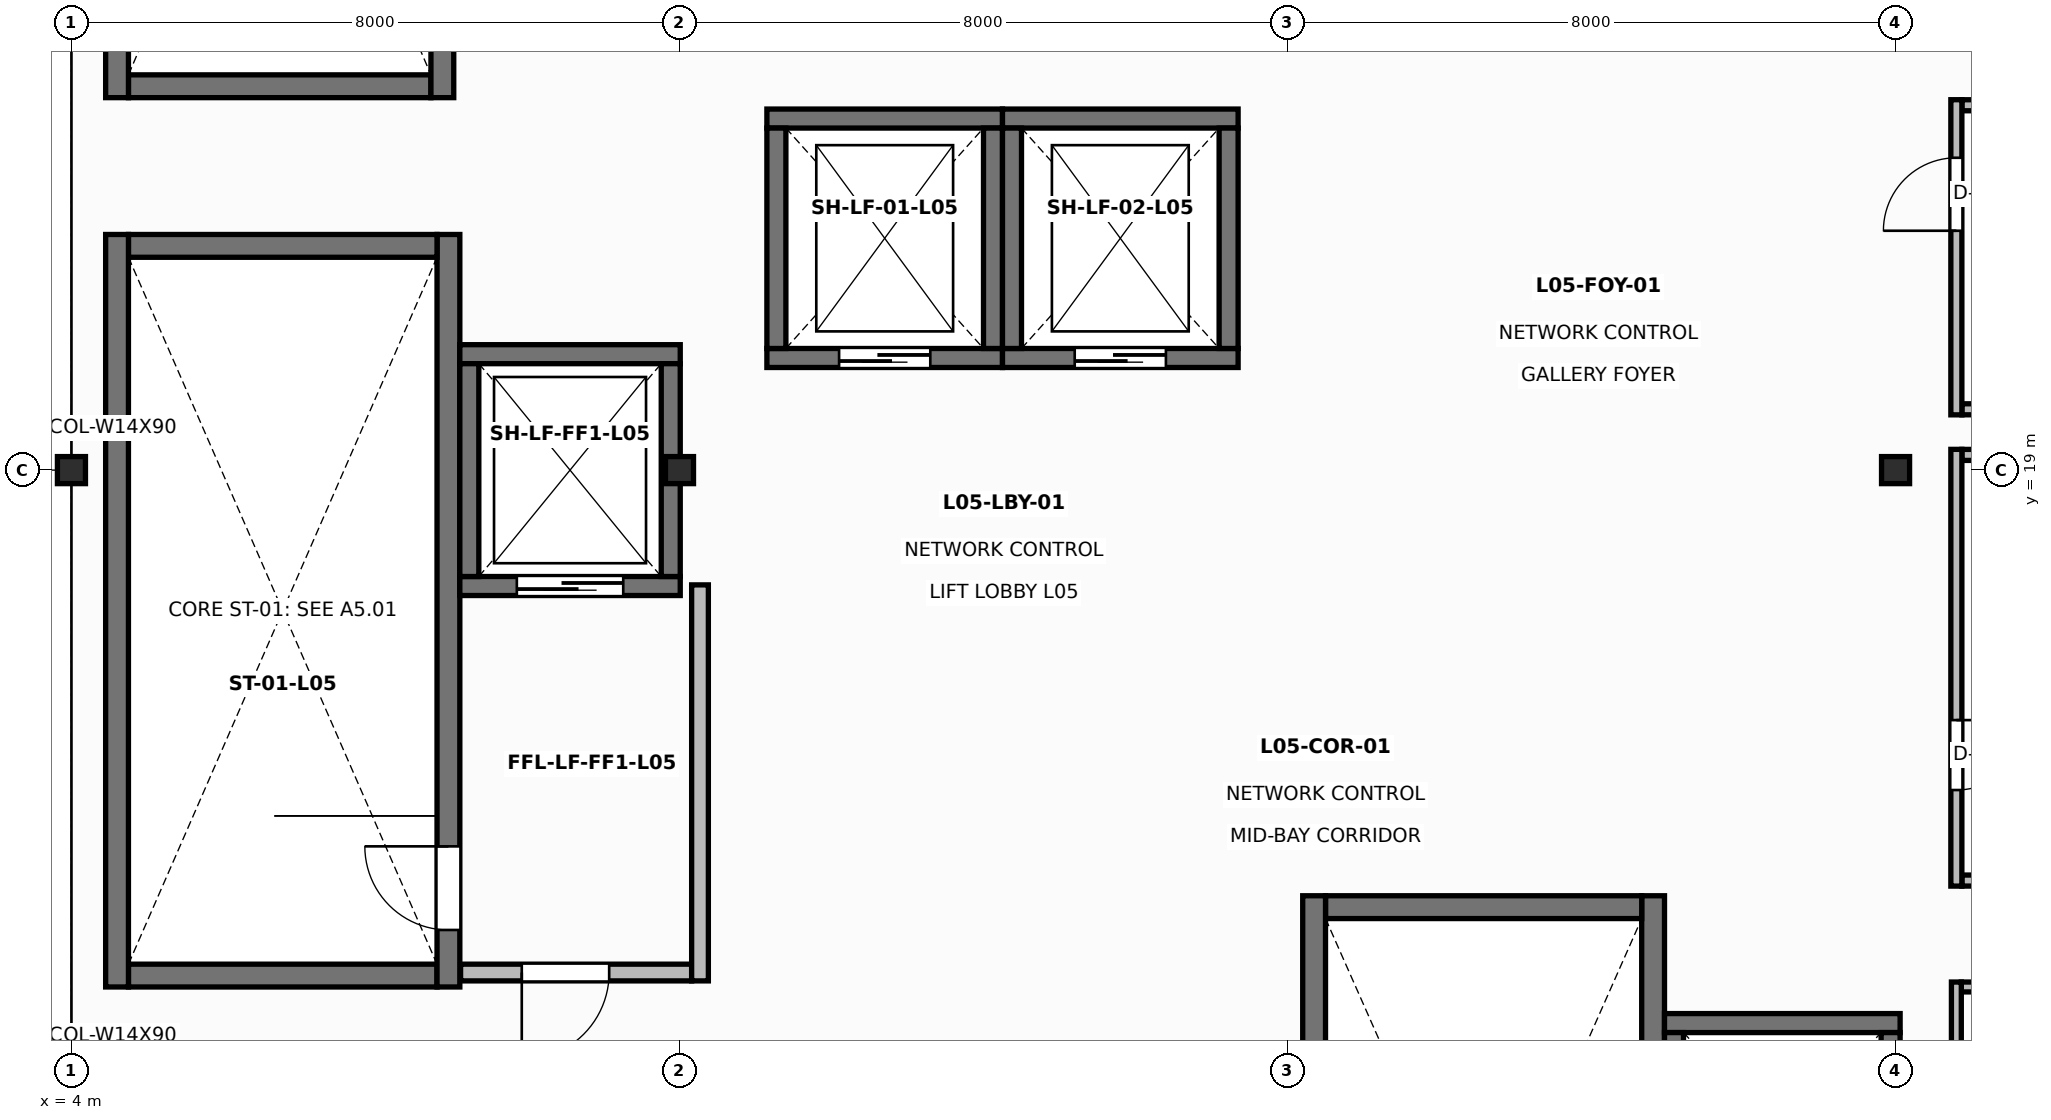
"""IFC4 building model, lengths in metres.
Left out: names, types, materials, properties, quantities, classifications, styles, units other than length and angle.
Written with IfcOpenShell. Run it as: python <this file> out.ifc"""

import sys

from ifc_helpers import new_model, si_unit, direction, frame, frame_2d, origin, origin_2d, place, context, subcontext, project, spatial, rectangle, i_section, extrude, element, fill, save


model = new_model("IFC4")
c1 = context("Model", 3, precision=1e-05, world=origin(), true_north=direction((0.0, 1.0)))
c2 = subcontext(c1, "Body", "Model", "MODEL_VIEW")
j1 = project(units=[si_unit("LENGTHUNIT", "METRE"), si_unit("PLANEANGLEUNIT", "RADIAN")], contexts=[c1])
p1 = place(None, origin())
s1 = spatial("IfcSite", under=j1, at=p1, CompositionType="ELEMENT")
p2 = place(p1, origin())
s2 = spatial("IfcBuilding", under=s1, at=p2, CompositionType="ELEMENT")
p3 = place(p2, frame((0.0, 0.0, 24.0)))
s3 = spatial("IfcBuildingStorey", under=s2, at=p3, CompositionType="ELEMENT", Elevation=24.0)
for number, where, z_axis, x_axis in (
    (1, (4.0, 19.0, 0.0), (0.0, 0.0, 1.0), (1.0, 0.0, 0.0)),
    (2, (12.0, 19.0, 0.0), (0.0, 0.0, 1.0), (1.0, 0.0, 0.0)),
    (3, (28.0, 19.0, 0.0), (0.0, 0.0, 1.0), (1.0, 0.0, 0.0)),
):
    element("IfcColumn", number, at=place(p3, frame(where, z_axis=z_axis, x_axis=x_axis)), inside=s3, PredefinedType="COLUMN", context=c2, shape_type="SweptSolid", body=[
        extrude(i_section(OverallWidth=0.369, OverallDepth=0.356, WebThickness=0.011, FlangeThickness=0.018, at=origin_2d()), origin(), (0.0, 0.0, 1.0), 4.0),
    ])
p4 = place(p3, frame((4.75, 12.35, 0.0), z_axis=(0.0, 0.0, 1.0), x_axis=(1.0, 0.0, 0.0)))
e4 = element("IfcWall", 4, at=p4, inside=s3, PredefinedType="SHEAR", context=c2, shape_type="SweptSolid", body=[
    extrude(rectangle(XDim=4.06, YDim=0.3, at=frame_2d((2.03, 0.0))), origin(), (0.0, 0.0, 1.0), 3.6),
])
p5 = place(p3, frame((8.96, 12.2, 0.0), z_axis=(0.0, 0.0, 1.0), x_axis=(0.0, 1.0, 0.0)))
e5 = element("IfcWall", 5, at=p5, inside=s3, PredefinedType="SHEAR", context=c2, shape_type="SweptSolid", body=[
    extrude(rectangle(XDim=9.9, YDim=0.3, at=frame_2d((4.95, 0.0))), origin(), (0.0, 0.0, 1.0), 3.6),
])
p6 = place(p5, frame((0.75, 0.0, 0.0)))
e6 = element("IfcOpeningElement", 6, at=p6, cuts=e5, PredefinedType="OPENING", context=c2, shape_type="SweptSolid", body=[
    extrude(rectangle(XDim=1.1, YDim=2.15, at=frame_2d((0.55, 1.075))), frame((0.0, 0.16, 0.0), z_axis=(0.0, -1.0, 0.0), x_axis=(1.0, 0.0, 0.0)), (0.0, 0.0, 1.0), 0.32),
])
p7 = place(p3, frame((8.81, 21.95, 0.0), z_axis=(0.0, 0.0, 1.0), x_axis=(-1.0, 0.0, 0.0)))
e7 = element("IfcWall", 7, at=p7, inside=s3, PredefinedType="SHEAR", context=c2, shape_type="SweptSolid", body=[
    extrude(rectangle(XDim=4.06, YDim=0.3, at=frame_2d((2.03, 0.0))), origin(), (0.0, 0.0, 1.0), 3.6),
])
p8 = place(p3, frame((4.6, 22.1, 0.0), z_axis=(0.0, 0.0, 1.0), x_axis=(0.0, -1.0, 0.0)))
e8 = element("IfcWall", 8, at=p8, inside=s3, PredefinedType="SHEAR", context=c2, shape_type="SweptSolid", body=[
    extrude(rectangle(XDim=9.9, YDim=0.3, at=frame_2d((4.95, 0.0))), origin(), (0.0, 0.0, 1.0), 3.6),
])
p9 = place(p3, frame((4.75, 24.05, 0.0), z_axis=(0.0, 0.0, 1.0), x_axis=(1.0, 0.0, 0.0)))
e9 = element("IfcWall", 9, at=p9, inside=s3, PredefinedType="SHEAR", context=c2, shape_type="SweptSolid", body=[
    extrude(rectangle(XDim=3.98, YDim=0.3, at=frame_2d((1.99, 0.0))), origin(), (0.0, 0.0, 1.0), 3.6),
])
p10 = place(p3, frame((8.88, 23.9, 0.0), z_axis=(0.0, 0.0, 1.0), x_axis=(0.0, 1.0, 0.0)))
e10 = element("IfcWall", 10, at=p10, inside=s3, PredefinedType="SHEAR", context=c2, shape_type="SweptSolid", body=[
    extrude(rectangle(XDim=9.9, YDim=0.3, at=frame_2d((4.95, 0.0))), origin(), (0.0, 0.0, 1.0), 3.6),
])
p11 = place(p10, frame((0.75, 0.0, 0.0)))
e11 = element("IfcOpeningElement", 11, at=p11, cuts=e10, PredefinedType="OPENING", context=c2, shape_type="SweptSolid", body=[
    extrude(rectangle(XDim=1.1, YDim=2.15, at=frame_2d((0.55, 1.075))), frame((0.0, 0.16, 0.0), z_axis=(0.0, -1.0, 0.0), x_axis=(1.0, 0.0, 0.0)), (0.0, 0.0, 1.0), 0.32),
])
p12 = place(p3, frame((4.6, 33.8, 0.0), z_axis=(0.0, 0.0, 1.0), x_axis=(0.0, -1.0, 0.0)))
e12 = element("IfcWall", 12, at=p12, inside=s3, PredefinedType="SHEAR", context=c2, shape_type="SweptSolid", body=[
    extrude(rectangle(XDim=9.9, YDim=0.3, at=frame_2d((4.95, 0.0))), origin(), (0.0, 0.0, 1.0), 3.6),
])
p13 = place(p3, frame((24.81, 3.4, 0.0), z_axis=(0.0, 0.0, 1.0), x_axis=(0.0, 1.0, 0.0)))
e13 = element("IfcWall", 13, at=p13, inside=s3, PredefinedType="SHEAR", context=c2, shape_type="SweptSolid", body=[
    extrude(rectangle(XDim=10.0, YDim=0.3, at=frame_2d((5.0, 0.0))), origin(), (0.0, 0.0, 1.0), 3.6),
])
p14 = place(p13, frame((0.75, 0.0, 0.0)))
e14 = element("IfcOpeningElement", 14, at=p14, cuts=e13, PredefinedType="OPENING", context=c2, shape_type="SweptSolid", body=[
    extrude(rectangle(XDim=1.1, YDim=2.15, at=frame_2d((0.55, 1.075))), frame((0.0, 0.16, 0.0), z_axis=(0.0, -1.0, 0.0), x_axis=(1.0, 0.0, 0.0)), (0.0, 0.0, 1.0), 0.32),
])
p15 = place(p3, frame((24.66, 13.25, 0.0), z_axis=(0.0, 0.0, 1.0), x_axis=(-1.0, 0.0, 0.0)))
e15 = element("IfcWall", 15, at=p15, inside=s3, PredefinedType="SHEAR", context=c2, shape_type="SweptSolid", body=[
    extrude(rectangle(XDim=4.16, YDim=0.3, at=frame_2d((2.08, 0.0))), origin(), (0.0, 0.0, 1.0), 3.6),
])
p16 = place(p3, frame((20.35, 13.4, 0.0), z_axis=(0.0, 0.0, 1.0), x_axis=(0.0, -1.0, 0.0)))
e16 = element("IfcWall", 16, at=p16, inside=s3, PredefinedType="SHEAR", context=c2, shape_type="SweptSolid", body=[
    extrude(rectangle(XDim=10.0, YDim=0.3, at=frame_2d((5.0, 0.0))), origin(), (0.0, 0.0, 1.0), 3.6),
])
p17 = place(p3, frame((9.11, 17.475, 0.0), z_axis=(0.0, 0.0, 1.0), x_axis=(1.0, 0.0, 0.0)))
e17 = element("IfcWall", 17, at=p17, inside=s3, PredefinedType="SOLIDWALL", context=c2, shape_type="SweptSolid", body=[
    extrude(rectangle(XDim=2.9, YDim=0.25, at=frame_2d((1.45, 0.0))), origin(), (0.0, 0.0, 1.0), 3.35),
])
p18 = place(p17, frame((0.75, 0.0, 0.0)))
e18 = element("IfcOpeningElement", 18, at=p18, cuts=e17, PredefinedType="OPENING", context=c2, shape_type="SweptSolid", body=[
    extrude(rectangle(XDim=1.4, YDim=2.25, at=frame_2d((0.7, 1.125))), frame((0.0, 0.135, 0.0), z_axis=(0.0, -1.0, 0.0), x_axis=(1.0, 0.0, 0.0)), (0.0, 0.0, 1.0), 0.27),
])
p19 = place(p3, frame((12.01, 20.525, 0.0), z_axis=(0.0, 0.0, 1.0), x_axis=(-1.0, 0.0, 0.0)))
e19 = element("IfcWall", 19, at=p19, inside=s3, PredefinedType="SOLIDWALL", context=c2, shape_type="SweptSolid", body=[
    extrude(rectangle(XDim=2.9, YDim=0.25, at=frame_2d((1.45, 0.0))), origin(), (0.0, 0.0, 1.0), 3.35),
])
for number, where, z_axis, x_axis in (
    (20, (11.885, 17.6, 0.0), (0.0, 0.0, 1.0), (0.0, 1.0, 0.0)),
    (21, (9.235, 20.4, 0.0), (0.0, 0.0, 1.0), (0.0, -1.0, 0.0)),
):
    element("IfcWall", number, at=place(p3, frame(where, z_axis=z_axis, x_axis=x_axis)), inside=s3, PredefinedType="SOLIDWALL", context=c2, shape_type="SweptSolid", body=[
        extrude(rectangle(XDim=2.8, YDim=0.25, at=frame_2d((1.4, 0.0))), origin(), (0.0, 0.0, 1.0), 3.35),
    ])
p20 = place(p3, frame((9.12, 12.39, 0.0), z_axis=(0.0, 0.0, 1.0), x_axis=(1.0, 0.0, 0.0)))
e22 = element("IfcWall", 22, at=p20, inside=s3, PredefinedType="SOLIDWALL", context=c2, shape_type="SweptSolid", body=[
    extrude(rectangle(XDim=3.04, YDim=0.22, at=frame_2d((1.52, 0.0))), origin(), (0.0, 0.0, 1.0), 3.35),
])
p21 = place(p20, frame((0.805, 0.0, 0.0)))
e23 = element("IfcOpeningElement", 23, at=p21, cuts=e22, PredefinedType="OPENING", context=c2, shape_type="SweptSolid", body=[
    extrude(rectangle(XDim=1.15, YDim=2.15, at=frame_2d((0.575, 1.075))), frame((0.0, 0.12, 0.0), z_axis=(0.0, -1.0, 0.0), x_axis=(1.0, 0.0, 0.0)), (0.0, 0.0, 1.0), 0.24),
])
p22 = place(p3, frame((12.27, 12.28, 0.0), z_axis=(0.0, 0.0, 1.0), x_axis=(0.0, 1.0, 0.0)))
e24 = element("IfcWall", 24, at=p22, inside=s3, PredefinedType="SOLIDWALL", context=c2, shape_type="SweptSolid", body=[
    extrude(rectangle(XDim=5.21, YDim=0.22, at=frame_2d((2.605, 0.0))), origin(), (0.0, 0.0, 1.0), 3.35),
])
p23 = place(p3, frame((28.06, 11.725, 0.0), z_axis=(0.0, 0.0, 1.0), x_axis=(-1.0, 0.0, 0.0)))
e25 = element("IfcWall", 25, at=p23, inside=s3, PredefinedType="SOLIDWALL", context=c2, shape_type="SweptSolid", body=[
    extrude(rectangle(XDim=3.1, YDim=0.25, at=frame_2d((1.55, 0.0))), origin(), (0.0, 0.0, 1.0), 3.35),
])
for number, where, z_axis, x_axis in (
    (26, (27.935, 8.8, 0.0), (0.0, 0.0, 1.0), (0.0, 1.0, 0.0)),
    (27, (25.085, 11.6, 0.0), (0.0, 0.0, 1.0), (0.0, -1.0, 0.0)),
):
    element("IfcWall", number, at=place(p3, frame(where, z_axis=z_axis, x_axis=x_axis)), inside=s3, PredefinedType="SOLIDWALL", context=c2, shape_type="SweptSolid", body=[
        extrude(rectangle(XDim=2.8, YDim=0.25, at=frame_2d((1.4, 0.0))), origin(), (0.0, 0.0, 1.0), 3.35),
    ])
p24 = place(p3, frame((13.15, 20.475, 0.0), z_axis=(0.0, 0.0, 1.0), x_axis=(1.0, 0.0, 0.0)))
e28 = element("IfcWall", 28, at=p24, inside=s3, PredefinedType="SOLIDWALL", context=c2, shape_type="SweptSolid", body=[
    extrude(rectangle(XDim=3.1, YDim=0.25, at=frame_2d((1.55, 0.0))), origin(), (0.0, 0.0, 1.0), 3.35),
])
p25 = place(p24, frame((0.95, 0.0, 0.0)))
e29 = element("IfcOpeningElement", 29, at=p25, cuts=e28, PredefinedType="OPENING", context=c2, shape_type="SweptSolid", body=[
    extrude(rectangle(XDim=1.2, YDim=2.2, at=frame_2d((0.6, 1.1))), frame((0.0, 0.135, 0.0), z_axis=(0.0, -1.0, 0.0), x_axis=(1.0, 0.0, 0.0)), (0.0, 0.0, 1.0), 0.27),
])
p26 = place(p3, frame((16.25, 23.625, 0.0), z_axis=(0.0, 0.0, 1.0), x_axis=(-1.0, 0.0, 0.0)))
e30 = element("IfcWall", 30, at=p26, inside=s3, PredefinedType="SOLIDWALL", context=c2, shape_type="SweptSolid", body=[
    extrude(rectangle(XDim=3.1, YDim=0.25, at=frame_2d((1.55, 0.0))), origin(), (0.0, 0.0, 1.0), 3.35),
])
for number, where, z_axis, x_axis in (
    (31, (16.125, 20.6, 0.0), (0.0, 0.0, 1.0), (0.0, 1.0, 0.0)),
    (32, (13.275, 23.5, 0.0), (0.0, 0.0, 1.0), (0.0, -1.0, 0.0)),
):
    element("IfcWall", number, at=place(p3, frame(where, z_axis=z_axis, x_axis=x_axis)), inside=s3, PredefinedType="SOLIDWALL", context=c2, shape_type="SweptSolid", body=[
        extrude(rectangle(XDim=2.9, YDim=0.25, at=frame_2d((1.45, 0.0))), origin(), (0.0, 0.0, 1.0), 3.35),
    ])
p27 = place(p3, frame((16.25, 20.475, 0.0), z_axis=(0.0, 0.0, 1.0), x_axis=(1.0, 0.0, 0.0)))
e33 = element("IfcWall", 33, at=p27, inside=s3, PredefinedType="SOLIDWALL", context=c2, shape_type="SweptSolid", body=[
    extrude(rectangle(XDim=3.1, YDim=0.25, at=frame_2d((1.55, 0.0))), origin(), (0.0, 0.0, 1.0), 3.35),
])
p28 = place(p27, frame((0.95, 0.0, 0.0)))
e34 = element("IfcOpeningElement", 34, at=p28, cuts=e33, PredefinedType="OPENING", context=c2, shape_type="SweptSolid", body=[
    extrude(rectangle(XDim=1.2, YDim=2.2, at=frame_2d((0.6, 1.1))), frame((0.0, 0.135, 0.0), z_axis=(0.0, -1.0, 0.0), x_axis=(1.0, 0.0, 0.0)), (0.0, 0.0, 1.0), 0.27),
])
p29 = place(p3, frame((19.35, 23.625, 0.0), z_axis=(0.0, 0.0, 1.0), x_axis=(-1.0, 0.0, 0.0)))
e35 = element("IfcWall", 35, at=p29, inside=s3, PredefinedType="SOLIDWALL", context=c2, shape_type="SweptSolid", body=[
    extrude(rectangle(XDim=3.1, YDim=0.25, at=frame_2d((1.55, 0.0))), origin(), (0.0, 0.0, 1.0), 3.35),
])
for number, where, z_axis, x_axis in (
    (36, (19.225, 20.6, 0.0), (0.0, 0.0, 1.0), (0.0, 1.0, 0.0)),
    (37, (16.375, 23.5, 0.0), (0.0, 0.0, 1.0), (0.0, -1.0, 0.0)),
):
    element("IfcWall", number, at=place(p3, frame(where, z_axis=z_axis, x_axis=x_axis)), inside=s3, PredefinedType="SOLIDWALL", context=c2, shape_type="SweptSolid", body=[
        extrude(rectangle(XDim=2.9, YDim=0.25, at=frame_2d((1.45, 0.0))), origin(), (0.0, 0.0, 1.0), 3.35),
    ])
p30 = place(p3, frame((34.935, 12.2, 0.0), z_axis=(0.0, 0.0, 1.0), x_axis=(-1.0, 0.0, 0.0)))
e38 = element("IfcWall", 38, at=p30, inside=s3, PredefinedType="PARTITIONING", context=c2, shape_type="SweptSolid", body=[
    extrude(rectangle(XDim=6.07, YDim=0.13, at=frame_2d((3.035, 0.0))), origin(), (0.0, 0.0, 1.0), 3.6),
])
p31 = place(p3, frame((28.8, 12.265, 0.0), z_axis=(0.0, 0.0, 1.0), x_axis=(0.0, -1.0, 0.0)))
e39 = element("IfcWall", 39, at=p31, inside=s3, PredefinedType="PARTITIONING", context=c2, shape_type="SweptSolid", body=[
    extrude(rectangle(XDim=8.13, YDim=0.13, at=frame_2d((4.065, 0.0))), origin(), (0.0, 0.0, 1.0), 3.6),
])
p32 = place(p31, frame((4.521, 0.0, 0.0)))
e40 = element("IfcOpeningElement", 40, at=p32, cuts=e39, PredefinedType="OPENING", context=c2, shape_type="SweptSolid", body=[
    extrude(rectangle(XDim=1.04, YDim=2.16, at=frame_2d((0.52, 1.08))), frame((0.0, 0.075, 0.0), z_axis=(0.0, -1.0, 0.0), x_axis=(1.0, 0.0, 0.0)), (0.0, 0.0, 1.0), 0.15),
])
for number, where, z_axis, x_axis in (
    (41, (28.873, 13.6, 0.0), (0.0, 0.0, 1.0), (1.0, 0.0, 0.0)),
    (42, (34.528, 19.2, 0.0), (0.0, 0.0, 1.0), (-1.0, 0.0, 0.0)),
):
    element("IfcWall", number, at=place(p3, frame(where, z_axis=z_axis, x_axis=x_axis)), inside=s3, PredefinedType="PARTITIONING", context=c2, shape_type="SweptSolid", body=[
        extrude(rectangle(XDim=5.655, YDim=0.145, at=frame_2d((2.828, 0.0))), origin(), (0.0, 0.0, 1.0), 3.6),
    ])
p33 = place(p3, frame((28.8, 19.273, 0.0), z_axis=(0.0, 0.0, 1.0), x_axis=(0.0, -1.0, 0.0)))
e43 = element("IfcWall", 43, at=p33, inside=s3, PredefinedType="PARTITIONING", context=c2, shape_type="SweptSolid", body=[
    extrude(rectangle(XDim=5.746, YDim=0.145, at=frame_2d((2.873, 0.0))), origin(), (0.0, 0.0, 1.0), 3.6),
])
p34 = place(p33, frame((3.562, 0.0, 0.0)))
e44 = element("IfcOpeningElement", 44, at=p34, cuts=e43, PredefinedType="OPENING", context=c2, shape_type="SweptSolid", body=[
    extrude(rectangle(XDim=0.92, YDim=2.1, at=frame_2d((0.46, 1.05))), frame((0.0, 0.083, 0.0), z_axis=(0.0, -1.0, 0.0), x_axis=(1.0, 0.0, 0.0)), (0.0, 0.0, 1.0), 0.165),
])
for number, where, z_axis, x_axis in (
    (45, (28.873, 19.8, 0.0), (0.0, 0.0, 1.0), (1.0, 0.0, 0.0)),
    (46, (34.528, 23.8, 0.0), (0.0, 0.0, 1.0), (-1.0, 0.0, 0.0)),
):
    element("IfcWall", number, at=place(p3, frame(where, z_axis=z_axis, x_axis=x_axis)), inside=s3, PredefinedType="PARTITIONING", context=c2, shape_type="SweptSolid", body=[
        extrude(rectangle(XDim=5.655, YDim=0.145, at=frame_2d((2.828, 0.0))), origin(), (0.0, 0.0, 1.0), 3.6),
    ])
p35 = place(p3, frame((28.8, 23.873, 0.0), z_axis=(0.0, 0.0, 1.0), x_axis=(0.0, -1.0, 0.0)))
e47 = element("IfcWall", 47, at=p35, inside=s3, PredefinedType="PARTITIONING", context=c2, shape_type="SweptSolid", body=[
    extrude(rectangle(XDim=4.146, YDim=0.145, at=frame_2d((2.073, 0.0))), origin(), (0.0, 0.0, 1.0), 3.6),
])
p36 = place(p35, frame((0.764, 0.0, 0.0)))
e48 = element("IfcOpeningElement", 48, at=p36, cuts=e47, PredefinedType="OPENING", context=c2, shape_type="SweptSolid", body=[
    extrude(rectangle(XDim=0.96, YDim=2.12, at=frame_2d((0.48, 1.06))), frame((0.0, 0.083, 0.0), z_axis=(0.0, -1.0, 0.0), x_axis=(1.0, 0.0, 0.0)), (0.0, 0.0, 1.0), 0.165),
])
p37 = place(p6, origin())
e49 = element("IfcDoor", 49, at=p37, inside=s3, OperationType="SINGLE_SWING_RIGHT", PredefinedType="DOOR", context=c2, shape_type="SweptSolid", body=[
    extrude(rectangle(XDim=1.1, YDim=2.15, at=frame_2d((0.55, 1.075))), frame((0.0, 0.025, 0.0), z_axis=(0.0, -1.0, 0.0), x_axis=(1.0, 0.0, 0.0)), (0.0, 0.0, 1.0), 0.05),
])
fill(e6, e49)
p38 = place(p18, frame((1.4, 0.0, 0.0), z_axis=(0.0, 0.0, 1.0), x_axis=(-1.0, 0.0, 0.0)))
e50 = element("IfcDoor", 50, at=p38, inside=s3, OperationType="DOUBLE_DOOR_SLIDING", PredefinedType="DOOR", context=c2, shape_type="SweptSolid", body=[
    extrude(rectangle(XDim=1.4, YDim=2.25, at=frame_2d((0.7, 1.125))), frame((0.0, 0.025, 0.0), z_axis=(0.0, -1.0, 0.0), x_axis=(1.0, 0.0, 0.0)), (0.0, 0.0, 1.0), 0.05),
])
fill(e18, e50)
p39 = place(p21, frame((1.15, 0.0, 0.0), z_axis=(0.0, 0.0, 1.0), x_axis=(-1.0, 0.0, 0.0)))
e51 = element("IfcDoor", 51, at=p39, inside=s3, OperationType="SINGLE_SWING_LEFT", PredefinedType="DOOR", context=c2, shape_type="SweptSolid", body=[
    extrude(rectangle(XDim=1.15, YDim=2.15, at=frame_2d((0.575, 1.075))), frame((0.0, 0.025, 0.0), z_axis=(0.0, -1.0, 0.0), x_axis=(1.0, 0.0, 0.0)), (0.0, 0.0, 1.0), 0.05),
])
fill(e23, e51)
p40 = place(p25, frame((1.2, 0.0, 0.0), z_axis=(0.0, 0.0, 1.0), x_axis=(-1.0, 0.0, 0.0)))
e52 = element("IfcDoor", 52, at=p40, inside=s3, OperationType="DOUBLE_DOOR_SLIDING", PredefinedType="DOOR", context=c2, shape_type="SweptSolid", body=[
    extrude(rectangle(XDim=1.2, YDim=2.2, at=frame_2d((0.6, 1.1))), frame((0.0, 0.025, 0.0), z_axis=(0.0, -1.0, 0.0), x_axis=(1.0, 0.0, 0.0)), (0.0, 0.0, 1.0), 0.05),
])
fill(e29, e52)
p41 = place(p28, frame((1.2, 0.0, 0.0), z_axis=(0.0, 0.0, 1.0), x_axis=(-1.0, 0.0, 0.0)))
e53 = element("IfcDoor", 53, at=p41, inside=s3, OperationType="DOUBLE_DOOR_SLIDING", PredefinedType="DOOR", context=c2, shape_type="SweptSolid", body=[
    extrude(rectangle(XDim=1.2, YDim=2.2, at=frame_2d((0.6, 1.1))), frame((0.0, 0.025, 0.0), z_axis=(0.0, -1.0, 0.0), x_axis=(1.0, 0.0, 0.0)), (0.0, 0.0, 1.0), 0.05),
])
fill(e34, e53)
p42 = place(p34, origin())
e54 = element("IfcDoor", 54, at=p42, inside=s3, OperationType="SINGLE_SWING_LEFT", PredefinedType="DOOR", context=c2, shape_type="SweptSolid", body=[
    extrude(rectangle(XDim=0.92, YDim=2.1, at=frame_2d((0.46, 1.05))), frame((0.0, 0.025, 0.0), z_axis=(0.0, -1.0, 0.0), x_axis=(1.0, 0.0, 0.0)), (0.0, 0.0, 1.0), 0.05),
])
fill(e44, e54)
p43 = place(p36, frame((0.96, 0.0, 0.0), z_axis=(0.0, 0.0, 1.0), x_axis=(-1.0, 0.0, 0.0)))
e55 = element("IfcDoor", 55, at=p43, inside=s3, OperationType="SINGLE_SWING_RIGHT", PredefinedType="DOOR", context=c2, shape_type="SweptSolid", body=[
    extrude(rectangle(XDim=0.96, YDim=2.12, at=frame_2d((0.48, 1.06))), frame((0.0, 0.025, 0.0), z_axis=(0.0, -1.0, 0.0), x_axis=(1.0, 0.0, 0.0)), (0.0, 0.0, 1.0), 0.05),
])
fill(e48, e55)
save(model, sys.argv[1])
